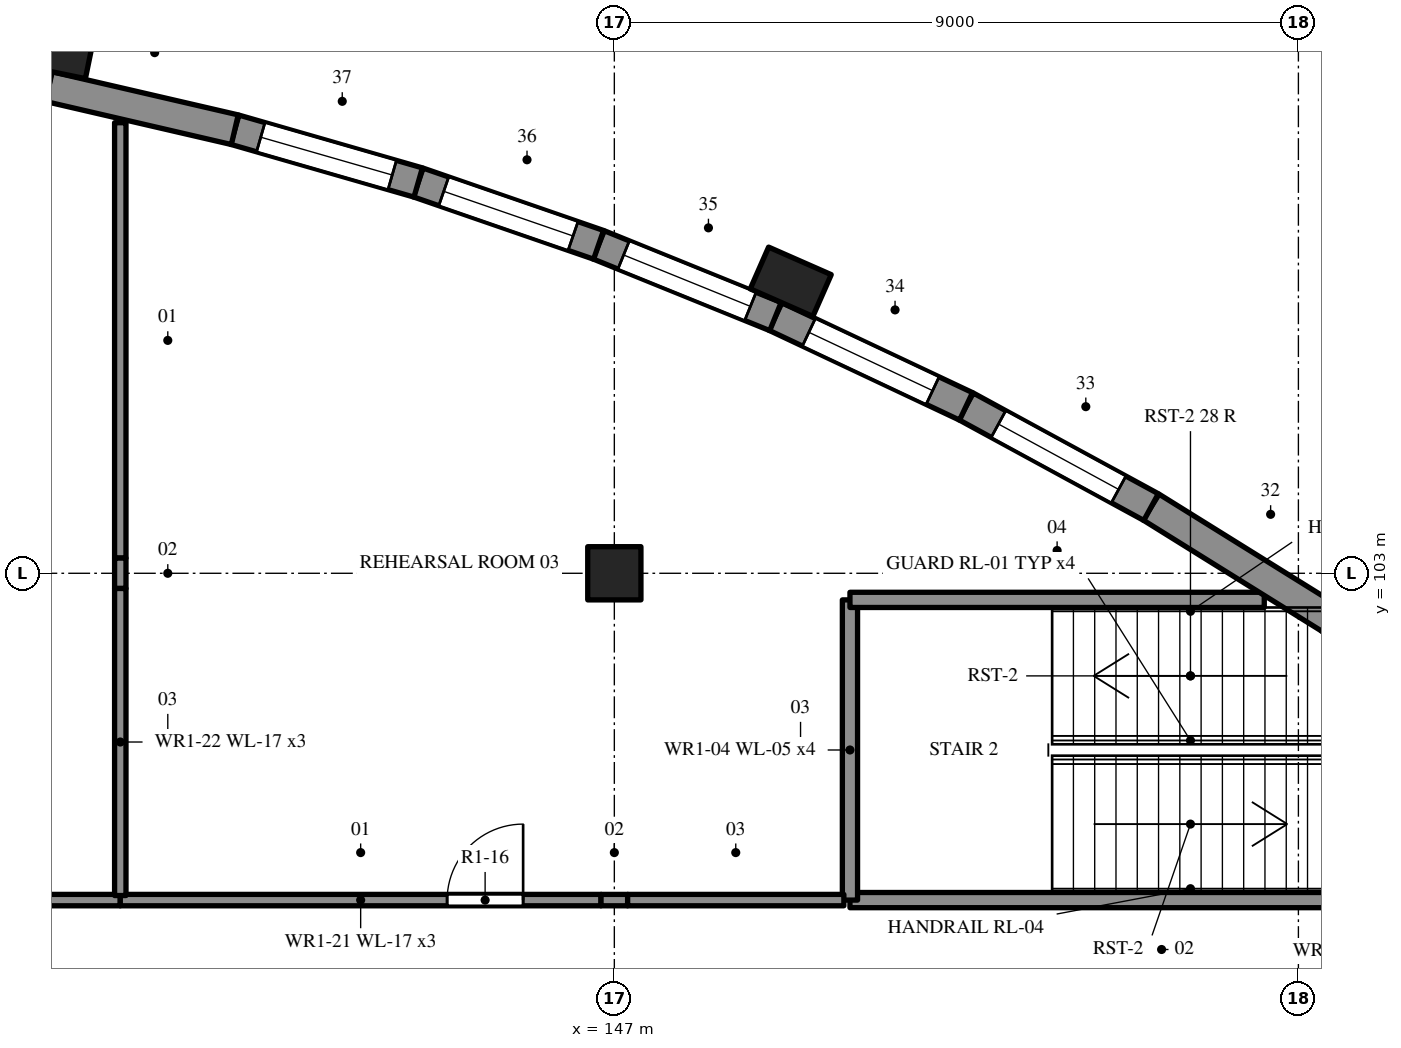
"""IFC4 building model, lengths in metres.
Left out: names, types, materials, properties, quantities, classifications, styles, units other than length and angle.
Written with IfcOpenShell. Run it as: python <this file> out.ifc"""

import sys

from ifc_helpers import new_model, si_unit, direction, frame, frame_2d, origin, origin_2d, place, context, subcontext, project, spatial, rectangle, extrude, element, fill, save


model = new_model("IFC4")
c1 = context("Model", 3, precision=1e-05, world=origin(), true_north=direction((0.0, 1.0)))
c2 = subcontext(c1, "Body", "Model", "MODEL_VIEW")
j1 = project(units=[si_unit("LENGTHUNIT", "METRE"), si_unit("PLANEANGLEUNIT", "RADIAN")], contexts=[c1])
p1 = place(None, origin())
s1 = spatial("IfcSite", under=j1, at=p1, CompositionType="ELEMENT")
p2 = place(p1, origin())
s2 = spatial("IfcBuilding", under=s1, at=p2, CompositionType="ELEMENT")
p3 = place(p2, frame((0.0, 0.0, 5.4)))
s3 = spatial("IfcBuildingStorey", under=s2, at=p3, CompositionType="ELEMENT", Elevation=5.4)
p4 = place(p3, frame((147.0, 103.0, 0.0), z_axis=(0.0, 0.0, 1.0), x_axis=(1.0, 0.0, 0.0)))
e1 = element("IfcColumn", 1, at=p4, inside=s3, PredefinedType="COLUMN", context=c2, shape_type="SweptSolid", body=[
    extrude(rectangle(XDim=0.7, YDim=0.7, at=origin_2d()), origin(), (0.0, 0.0, 1.0), 4.52),
])
p5 = place(p3, frame((158.3, 98.7, 0.0), z_axis=(0.0, 0.0, 1.0), x_axis=(-1.0, 0.0, 0.0)))
e2 = element("IfcWall", 2, at=p5, inside=s3, PredefinedType="SHEAR", context=c2, shape_type="SweptSolid", body=[
    extrude(rectangle(XDim=8.2, YDim=0.2, at=frame_2d((4.1, 0.0))), origin(), (0.0, 0.0, 1.0), 4.8),
])
p6 = place(p5, frame((0.25, 0.0, 0.0)))
e3 = element("IfcOpeningElement", 3, at=p6, cuts=e2, PredefinedType="OPENING", context=c2, shape_type="SweptSolid", body=[
    extrude(rectangle(XDim=1.0, YDim=2.4, at=frame_2d((0.5, 1.2))), frame((0.0, 0.11, 0.0), z_axis=(0.0, -1.0, 0.0), x_axis=(1.0, 0.0, 0.0)), (0.0, 0.0, 1.0), 0.22),
])
p7 = place(p3, frame((150.1, 98.7, 0.0), z_axis=(0.0, 0.0, 1.0), x_axis=(0.0, 1.0, 0.0)))
e4 = element("IfcWall", 4, at=p7, inside=s3, PredefinedType="SHEAR", context=c2, shape_type="SweptSolid", body=[
    extrude(rectangle(XDim=3.95, YDim=0.2, at=frame_2d((1.975, 0.0))), origin(), (0.0, 0.0, 1.0), 4.8),
])
p8 = place(p3, frame((150.1, 102.65, 0.0), z_axis=(0.0, 0.0, 1.0), x_axis=(1.0, 0.0, 0.0)))
e5 = element("IfcWall", 5, at=p8, inside=s3, PredefinedType="SHEAR", context=c2, shape_type="SweptSolid", body=[
    extrude(rectangle(XDim=5.451, YDim=0.2, at=frame_2d((2.726, 0.0))), origin(), (0.0, 0.0, 1.0), 4.8),
])
p9 = place(p3, frame((156.415, 102.407, 0.0), z_axis=(0.0, 0.0, 1.0), x_axis=(-0.84912946359, 0.528184772653, 0.0)))
e6 = element("IfcWall", 6, at=p9, inside=s3, PredefinedType="SOLIDWALL", context=c2, shape_type="SweptSolid", body=[
    extrude(rectangle(XDim=2.772, YDim=0.4, at=frame_2d((1.386, 0.0))), origin(), (0.0, 0.0, 1.0), 4.8),
])
p10 = place(p3, frame((154.062, 103.871, 0.0), z_axis=(0.0, 0.0, 1.0), x_axis=(-0.878255502871, 0.478191668347, 0.0)))
e7 = element("IfcWall", 7, at=p10, inside=s3, PredefinedType="SOLIDWALL", context=c2, shape_type="SweptSolid", body=[
    extrude(rectangle(XDim=2.772, YDim=0.4, at=frame_2d((1.386, 0.0))), origin(), (0.0, 0.0, 1.0), 4.8),
])
p11 = place(p10, frame((0.486, 0.0, 1.0)))
e8 = element("IfcOpeningElement", 8, at=p11, cuts=e7, PredefinedType="OPENING", context=c2, shape_type="SweptSolid", body=[
    extrude(rectangle(XDim=1.8, YDim=2.1, at=frame_2d((0.9, 1.05))), frame((0.0, 0.21, 0.0), z_axis=(0.0, -1.0, 0.0), x_axis=(1.0, 0.0, 0.0)), (0.0, 0.0, 1.0), 0.42),
])
p12 = place(p3, frame((151.627, 105.196, 0.0), z_axis=(0.0, 0.0, 1.0), x_axis=(-0.904561064695, 0.42634408667, 0.0)))
e9 = element("IfcWall", 9, at=p12, inside=s3, PredefinedType="SOLIDWALL", context=c2, shape_type="SweptSolid", body=[
    extrude(rectangle(XDim=2.772, YDim=0.4, at=frame_2d((1.386, 0.0))), origin(), (0.0, 0.0, 1.0), 4.8),
])
p13 = place(p12, frame((0.486, 0.0, 1.0)))
e10 = element("IfcOpeningElement", 10, at=p13, cuts=e9, PredefinedType="OPENING", context=c2, shape_type="SweptSolid", body=[
    extrude(rectangle(XDim=1.8, YDim=2.1, at=frame_2d((0.9, 1.05))), frame((0.0, 0.21, 0.0), z_axis=(0.0, -1.0, 0.0), x_axis=(1.0, 0.0, 0.0)), (0.0, 0.0, 1.0), 0.42),
])
p14 = place(p3, frame((149.12, 106.378, 0.0), z_axis=(0.0, 0.0, 1.0), x_axis=(-0.926688932252, 0.375829246921, 0.0)))
e11 = element("IfcWall", 11, at=p14, inside=s3, PredefinedType="SOLIDWALL", context=c2, shape_type="SweptSolid", body=[
    extrude(rectangle(XDim=2.511, YDim=0.4, at=frame_2d((1.255, 0.0))), origin(), (0.0, 0.0, 1.0), 4.8),
])
p15 = place(p14, frame((0.355, 0.0, 1.0)))
e12 = element("IfcOpeningElement", 12, at=p15, cuts=e11, PredefinedType="OPENING", context=c2, shape_type="SweptSolid", body=[
    extrude(rectangle(XDim=1.8, YDim=2.1, at=frame_2d((0.9, 1.05))), frame((0.0, 0.21, 0.0), z_axis=(0.0, -1.0, 0.0), x_axis=(1.0, 0.0, 0.0)), (0.0, 0.0, 1.0), 0.42),
])
p16 = place(p3, frame((146.793, 107.322, 0.0), z_axis=(0.0, 0.0, 1.0), x_axis=(-0.945175475032, 0.326562890417, 0.0)))
e13 = element("IfcWall", 13, at=p16, inside=s3, PredefinedType="SOLIDWALL", context=c2, shape_type="SweptSolid", body=[
    extrude(rectangle(XDim=2.511, YDim=0.4, at=frame_2d((1.256, 0.0))), origin(), (0.0, 0.0, 1.0), 4.8),
])
p17 = place(p16, frame((0.355, 0.0, 1.0)))
e14 = element("IfcOpeningElement", 14, at=p17, cuts=e13, PredefinedType="OPENING", context=c2, shape_type="SweptSolid", body=[
    extrude(rectangle(XDim=1.8, YDim=2.1, at=frame_2d((0.9, 1.05))), frame((0.0, 0.21, 0.0), z_axis=(0.0, -1.0, 0.0), x_axis=(1.0, 0.0, 0.0)), (0.0, 0.0, 1.0), 0.42),
])
p18 = place(p3, frame((144.419, 108.142, 0.0), z_axis=(0.0, 0.0, 1.0), x_axis=(-0.961008605775, 0.276518461637, 0.0)))
e15 = element("IfcWall", 15, at=p18, inside=s3, PredefinedType="SOLIDWALL", context=c2, shape_type="SweptSolid", body=[
    extrude(rectangle(XDim=2.511, YDim=0.4, at=frame_2d((1.255, 0.0))), origin(), (0.0, 0.0, 1.0), 4.8),
])
p19 = place(p18, frame((0.355, 0.0, 1.0)))
e16 = element("IfcOpeningElement", 16, at=p19, cuts=e15, PredefinedType="OPENING", context=c2, shape_type="SweptSolid", body=[
    extrude(rectangle(XDim=1.8, YDim=2.1, at=frame_2d((0.9, 1.05))), frame((0.0, 0.21, 0.0), z_axis=(0.0, -1.0, 0.0), x_axis=(1.0, 0.0, 0.0)), (0.0, 0.0, 1.0), 0.42),
])
p20 = place(p3, frame((142.006, 108.836, 0.0), z_axis=(0.0, 0.0, 1.0), x_axis=(-0.974189274843, 0.225732710925, 0.0)))
e17 = element("IfcWall", 17, at=p20, inside=s3, PredefinedType="SOLIDWALL", context=c2, shape_type="SweptSolid", body=[
    extrude(rectangle(XDim=2.511, YDim=0.4, at=frame_2d((1.256, 0.0))), origin(), (0.0, 0.0, 1.0), 4.8),
])
for number, where, z_axis, x_axis in (
    (18, (139.66, 109.893, 0.0), (0.0, 0.0, 1.0), (-0.98, 0.201, 0.0)),
    (19, (149.321, 106.836, 0.0), (0.0, 0.0, 1.0), (-0.915, 0.403, 0.0)),
):
    element("IfcColumn", number, at=place(p3, frame(where, z_axis=z_axis, x_axis=x_axis)), inside=s3, PredefinedType="PILASTER", context=c2, shape_type="SweptSolid", body=[
        extrude(rectangle(XDim=0.9, YDim=0.6, at=origin_2d()), origin(), (0.0, 0.0, 1.0), 4.8),
    ])
p21 = place(p3, frame((138.175, 98.7, 0.0), z_axis=(0.0, 0.0, 1.0), x_axis=(1.0, 0.0, 0.0)))
e20 = element("IfcWall", 20, at=p21, inside=s3, PredefinedType="PARTITIONING", context=c2, shape_type="SweptSolid", body=[
    extrude(rectangle(XDim=2.325, YDim=0.15, at=frame_2d((1.163, 0.0))), origin(), (0.0, 0.0, 1.0), 4.52),
])
p22 = place(p3, frame((140.5, 98.7, 0.0), z_axis=(0.0, 0.0, 1.0), x_axis=(1.0, 0.0, 0.0)))
e21 = element("IfcWall", 21, at=p22, inside=s3, PredefinedType="PARTITIONING", context=c2, shape_type="SweptSolid", body=[
    extrude(rectangle(XDim=6.325, YDim=0.15, at=frame_2d((3.163, 0.0))), origin(), (0.0, 0.0, 1.0), 4.52),
])
p23 = place(p22, frame((4.3, 0.0, 0.0)))
e22 = element("IfcOpeningElement", 22, at=p23, cuts=e21, PredefinedType="OPENING", context=c2, shape_type="SweptSolid", body=[
    extrude(rectangle(XDim=1.0, YDim=2.1, at=frame_2d((0.5, 1.05))), frame((0.0, 0.085, 0.0), z_axis=(0.0, -1.0, 0.0), x_axis=(1.0, 0.0, 0.0)), (0.0, 0.0, 1.0), 0.17),
])
p24 = place(p3, frame((146.825, 98.7, 0.0), z_axis=(0.0, 0.0, 1.0), x_axis=(1.0, 0.0, 0.0)))
e23 = element("IfcWall", 23, at=p24, inside=s3, PredefinedType="PARTITIONING", context=c2, shape_type="SweptSolid", body=[
    extrude(rectangle(XDim=0.35, YDim=0.15, at=frame_2d((0.175, 0.0))), origin(), (0.0, 0.0, 1.0), 3.82),
])
p25 = place(p3, frame((147.175, 98.7, 0.0), z_axis=(0.0, 0.0, 1.0), x_axis=(1.0, 0.0, 0.0)))
e24 = element("IfcWall", 24, at=p25, inside=s3, PredefinedType="PARTITIONING", context=c2, shape_type="SweptSolid", body=[
    extrude(rectangle(XDim=2.845, YDim=0.15, at=frame_2d((1.422, 0.0))), origin(), (0.0, 0.0, 1.0), 4.52),
])
p26 = place(p3, frame((140.5, 108.928, 0.0), z_axis=(0.0, 0.0, 1.0), x_axis=(0.0, -1.0, 0.0)))
e25 = element("IfcWall", 25, at=p26, inside=s3, PredefinedType="PARTITIONING", context=c2, shape_type="SweptSolid", body=[
    extrude(rectangle(XDim=5.729, YDim=0.15, at=frame_2d((2.864, 0.0))), origin(), (0.0, 0.0, 1.0), 4.52),
])
p27 = place(p3, frame((140.5, 103.2, 0.0), z_axis=(0.0, 0.0, 1.0), x_axis=(0.0, -1.0, 0.0)))
e26 = element("IfcWall", 26, at=p27, inside=s3, PredefinedType="PARTITIONING", context=c2, shape_type="SweptSolid", body=[
    extrude(rectangle(XDim=0.4, YDim=0.15, at=frame_2d((0.2, 0.0))), origin(), (0.0, 0.0, 1.0), 3.72),
])
p28 = place(p3, frame((140.5, 102.8, 0.0), z_axis=(0.0, 0.0, 1.0), x_axis=(0.0, -1.0, 0.0)))
e27 = element("IfcWall", 27, at=p28, inside=s3, PredefinedType="PARTITIONING", context=c2, shape_type="SweptSolid", body=[
    extrude(rectangle(XDim=4.04, YDim=0.15, at=frame_2d((2.02, 0.0))), origin(), (0.0, 0.0, 1.0), 4.52),
])
p29 = place(p11, origin())
e28 = element("IfcWindow", 28, at=p29, inside=s3, PartitioningType="SINGLE_PANEL", PredefinedType="WINDOW", context=c2, shape_type="SweptSolid", body=[
    extrude(rectangle(XDim=1.8, YDim=2.1, at=frame_2d((0.9, 1.05))), frame((0.0, 0.03, 0.0), z_axis=(0.0, -1.0, 0.0), x_axis=(1.0, 0.0, 0.0)), (0.0, 0.0, 1.0), 0.06),
])
fill(e8, e28)
p30 = place(p13, origin())
e29 = element("IfcWindow", 29, at=p30, inside=s3, PartitioningType="SINGLE_PANEL", PredefinedType="WINDOW", context=c2, shape_type="SweptSolid", body=[
    extrude(rectangle(XDim=1.8, YDim=2.1, at=frame_2d((0.9, 1.05))), frame((0.0, 0.03, 0.0), z_axis=(0.0, -1.0, 0.0), x_axis=(1.0, 0.0, 0.0)), (0.0, 0.0, 1.0), 0.06),
])
fill(e10, e29)
p31 = place(p15, origin())
e30 = element("IfcWindow", 30, at=p31, inside=s3, PartitioningType="SINGLE_PANEL", PredefinedType="WINDOW", context=c2, shape_type="SweptSolid", body=[
    extrude(rectangle(XDim=1.8, YDim=2.1, at=frame_2d((0.9, 1.05))), frame((0.0, 0.03, 0.0), z_axis=(0.0, -1.0, 0.0), x_axis=(1.0, 0.0, 0.0)), (0.0, 0.0, 1.0), 0.06),
])
fill(e12, e30)
p32 = place(p17, origin())
e31 = element("IfcWindow", 31, at=p32, inside=s3, PartitioningType="SINGLE_PANEL", PredefinedType="WINDOW", context=c2, shape_type="SweptSolid", body=[
    extrude(rectangle(XDim=1.8, YDim=2.1, at=frame_2d((0.9, 1.05))), frame((0.0, 0.03, 0.0), z_axis=(0.0, -1.0, 0.0), x_axis=(1.0, 0.0, 0.0)), (0.0, 0.0, 1.0), 0.06),
])
fill(e14, e31)
p33 = place(p19, origin())
e32 = element("IfcWindow", 32, at=p33, inside=s3, PartitioningType="SINGLE_PANEL", PredefinedType="WINDOW", context=c2, shape_type="SweptSolid", body=[
    extrude(rectangle(XDim=1.8, YDim=2.1, at=frame_2d((0.9, 1.05))), frame((0.0, 0.03, 0.0), z_axis=(0.0, -1.0, 0.0), x_axis=(1.0, 0.0, 0.0)), (0.0, 0.0, 1.0), 0.06),
])
fill(e16, e32)
p34 = place(p23, origin())
e33 = element("IfcDoor", 33, at=p34, inside=s3, OperationType="SINGLE_SWING_RIGHT", PredefinedType="DOOR", context=c2, shape_type="SweptSolid", body=[
    extrude(rectangle(XDim=1.0, YDim=2.1, at=frame_2d((0.5, 1.05))), frame((0.0, 0.025, 0.0), z_axis=(0.0, -1.0, 0.0), x_axis=(1.0, 0.0, 0.0)), (0.0, 0.0, 1.0), 0.05),
])
fill(e22, e33)
save(model, sys.argv[1])
